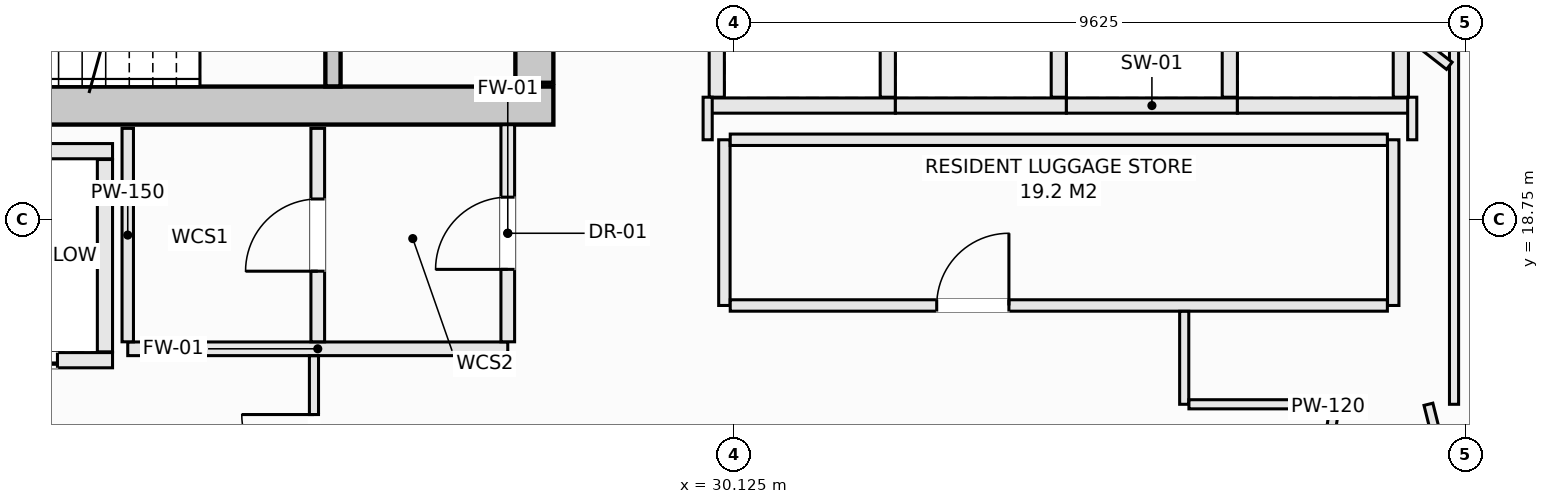
"""IFC4 building model, lengths in metres.
Left out: names, types, materials, properties, quantities, classifications, styles, units other than length and angle.
Written with IfcOpenShell. Run it as: python <this file> out.ifc"""

import sys

from ifc_helpers import new_model, si_unit, direction, frame, frame_2d, origin, place, context, subcontext, project, spatial, rectangle, extrude, element, fill, save


model = new_model("IFC4")
c1 = context("Model", 3, precision=1e-05, world=origin(), true_north=direction((0.0, 1.0)))
c2 = subcontext(c1, "Body", "Model", "MODEL_VIEW")
j1 = project(units=[si_unit("LENGTHUNIT", "METRE"), si_unit("PLANEANGLEUNIT", "RADIAN")], contexts=[c1])
p1 = place(None, origin())
s1 = spatial("IfcSite", under=j1, at=p1, CompositionType="ELEMENT")
p2 = place(p1, origin())
s2 = spatial("IfcBuilding", under=s1, at=p2, CompositionType="ELEMENT")
p3 = place(p2, frame((0.0, 0.0, 206.3)))
s3 = spatial("IfcBuildingStorey", under=s2, at=p3, CompositionType="ELEMENT", Elevation=206.3)
p4 = place(p3, frame((14.25, 20.25, -0.27), z_axis=(0.0, 0.0, 1.0), x_axis=(1.0, 0.0, 0.0)))
e1 = element("IfcWall", 1, at=p4, inside=s3, PredefinedType="SHEAR", context=c2, shape_type="SweptSolid", body=[
    extrude(rectangle(XDim=13.5, YDim=0.5, at=frame_2d((6.75, 0.0))), origin(), (0.0, 0.0, 1.0), 3.3),
])
p5 = place(p3, frame((27.5, 20.55, -0.27), z_axis=(0.0, 0.0, 1.0), x_axis=(0.0, 1.0, 0.0)))
e2 = element("IfcWall", 2, at=p5, inside=s3, PredefinedType="SHEAR", context=c2, shape_type="SweptSolid", body=[
    extrude(rectangle(XDim=1.5, YDim=0.5, at=frame_2d((0.75, 0.0))), origin(), (0.0, 0.0, 1.0), 3.3),
])
p6 = place(p3, frame((24.85, 20.502, -0.27), z_axis=(0.0, 0.0, 1.0), x_axis=(0.0, 1.0, 0.0)))
e3 = element("IfcWall", 3, at=p6, inside=s3, PredefinedType="SHEAR", context=c2, shape_type="SweptSolid", body=[
    extrude(rectangle(XDim=3.038, YDim=0.2, at=frame_2d((1.519, 0.0))), origin(), (0.0, 0.0, 1.0), 3.3),
])
p7 = place(p6, frame((0.969, 0.0, 0.27)))
e4 = element("IfcOpeningElement", 4, at=p7, cuts=e3, PredefinedType="OPENING", context=c2, shape_type="SweptSolid", body=[
    extrude(rectangle(XDim=1.1, YDim=2.15, at=frame_2d((0.55, 1.075))), frame((0.0, 0.11, 0.0), z_axis=(0.0, -1.0, 0.0), x_axis=(1.0, 0.0, 0.0)), (0.0, 0.0, 1.0), 0.22),
])
p8 = place(p3, frame((19.4, 19.65, 0.0), z_axis=(0.0, 0.0, 1.0), x_axis=(1.0, 0.0, 0.0)))
e5 = element("IfcWall", 5, at=p8, inside=s3, PredefinedType="SOLIDWALL", context=c2, shape_type="SweptSolid", body=[
    extrude(rectangle(XDim=2.55, YDim=0.2, at=frame_2d((1.275, 0.0))), origin(), (0.0, 0.0, 1.0), 3.03),
])
p9 = place(p3, frame((19.4, 16.9, 0.0), z_axis=(0.0, 0.0, 1.0), x_axis=(1.0, 0.0, 0.0)))
e6 = element("IfcWall", 6, at=p9, inside=s3, PredefinedType="SOLIDWALL", context=c2, shape_type="SweptSolid", body=[
    extrude(rectangle(XDim=2.55, YDim=0.2, at=frame_2d((1.275, 0.0))), origin(), (0.0, 0.0, 1.0), 3.03),
])
p10 = place(p9, frame((0.725, 0.0, 0.0)))
e7 = element("IfcOpeningElement", 7, at=p10, cuts=e6, PredefinedType="OPENING", context=c2, shape_type="SweptSolid", body=[
    extrude(rectangle(XDim=1.1, YDim=2.2, at=frame_2d((0.55, 1.1))), frame((0.0, 0.11, 0.0), z_axis=(0.0, -1.0, 0.0), x_axis=(1.0, 0.0, 0.0)), (0.0, 0.0, 1.0), 0.22),
])
p11 = place(p3, frame((21.85, 17.01, 0.0), z_axis=(0.0, 0.0, 1.0), x_axis=(0.0, 1.0, 0.0)))
e8 = element("IfcWall", 8, at=p11, inside=s3, PredefinedType="SOLIDWALL", context=c2, shape_type="SweptSolid", body=[
    extrude(rectangle(XDim=2.53, YDim=0.2, at=frame_2d((1.265, 0.0))), origin(), (0.0, 0.0, 1.0), 3.03),
])
p12 = place(p3, frame((29.8, 20.25, 0.0), z_axis=(0.0, 0.0, 1.0), x_axis=(1.0, 0.0, 0.0)))
e9 = element("IfcWall", 9, at=p12, inside=s3, PredefinedType="SOLIDWALL", context=c2, shape_type="SweptSolid", body=[
    extrude(rectangle(XDim=2.45, YDim=0.2, at=frame_2d((1.225, 0.0))), origin(), (0.0, 0.0, 1.0), 3.03),
])
for number, where, z_axis, x_axis in (
    (10, (29.9, 20.36, 0.0), (0.0, 0.0, 1.0), (0.0, 1.0, 0.0)),
    (11, (32.15, 20.36, 0.0), (0.0, 0.0, 1.0), (0.0, 1.0, 0.0)),
):
    element("IfcWall", number, at=place(p3, frame(where, z_axis=z_axis, x_axis=x_axis)), inside=s3, PredefinedType="SOLIDWALL", context=c2, shape_type="SweptSolid", body=[
        extrude(rectangle(XDim=2.43, YDim=0.2, at=frame_2d((1.215, 0.0))), origin(), (0.0, 0.0, 1.0), 3.03),
    ])
p13 = place(p3, frame((32.25, 20.25, 0.0), z_axis=(0.0, 0.0, 1.0), x_axis=(1.0, 0.0, 0.0)))
e12 = element("IfcWall", 12, at=p13, inside=s3, PredefinedType="SOLIDWALL", context=c2, shape_type="SweptSolid", body=[
    extrude(rectangle(XDim=2.25, YDim=0.2, at=frame_2d((1.125, 0.0))), origin(), (0.0, 0.0, 1.0), 3.03),
])
p14 = place(p3, frame((34.4, 20.36, 0.0), z_axis=(0.0, 0.0, 1.0), x_axis=(0.0, 1.0, 0.0)))
e13 = element("IfcWall", 13, at=p14, inside=s3, PredefinedType="SOLIDWALL", context=c2, shape_type="SweptSolid", body=[
    extrude(rectangle(XDim=2.43, YDim=0.2, at=frame_2d((1.215, 0.0))), origin(), (0.0, 0.0, 1.0), 3.03),
])
p15 = place(p3, frame((34.5, 20.25, 0.0), z_axis=(0.0, 0.0, 1.0), x_axis=(1.0, 0.0, 0.0)))
e14 = element("IfcWall", 14, at=p15, inside=s3, PredefinedType="SOLIDWALL", context=c2, shape_type="SweptSolid", body=[
    extrude(rectangle(XDim=2.25, YDim=0.2, at=frame_2d((1.125, 0.0))), origin(), (0.0, 0.0, 1.0), 3.03),
])
p16 = place(p3, frame((36.65, 20.36, 0.0), z_axis=(0.0, 0.0, 1.0), x_axis=(0.0, 1.0, 0.0)))
e15 = element("IfcWall", 15, at=p16, inside=s3, PredefinedType="SOLIDWALL", context=c2, shape_type="SweptSolid", body=[
    extrude(rectangle(XDim=2.43, YDim=0.2, at=frame_2d((1.215, 0.0))), origin(), (0.0, 0.0, 1.0), 3.03),
])
p17 = place(p3, frame((36.75, 20.25, 0.0), z_axis=(0.0, 0.0, 1.0), x_axis=(1.0, 0.0, 0.0)))
e16 = element("IfcWall", 16, at=p17, inside=s3, PredefinedType="SOLIDWALL", context=c2, shape_type="SweptSolid", body=[
    extrude(rectangle(XDim=2.25, YDim=0.2, at=frame_2d((1.125, 0.0))), origin(), (0.0, 0.0, 1.0), 3.03),
])
p18 = place(p3, frame((38.9, 20.36, 0.0), z_axis=(0.0, 0.0, 1.0), x_axis=(0.0, 1.0, 0.0)))
e17 = element("IfcWall", 17, at=p18, inside=s3, PredefinedType="SOLIDWALL", context=c2, shape_type="SweptSolid", body=[
    extrude(rectangle(XDim=2.43, YDim=0.2, at=frame_2d((1.215, 0.0))), origin(), (0.0, 0.0, 1.0), 3.03),
])
p19 = place(p3, frame((22.15, 17.05, 0.0), z_axis=(0.0, 0.0, 1.0), x_axis=(1.0, 0.0, 0.0)))
e18 = element("IfcWall", 18, at=p19, inside=s3, PredefinedType="SOLIDWALL", context=c2, shape_type="SweptSolid", body=[
    extrude(rectangle(XDim=5.0, YDim=0.18, at=frame_2d((2.5, 0.0))), origin(), (0.0, 0.0, 1.0), 3.03),
])
p20 = place(p3, frame((22.15, 17.142, 0.0), z_axis=(0.0, 0.0, 1.0), x_axis=(0.0, 1.0, 0.0)))
e19 = element("IfcWall", 19, at=p20, inside=s3, PredefinedType="PARTITIONING", context=c2, shape_type="SweptSolid", body=[
    extrude(rectangle(XDim=2.808, YDim=0.15, at=frame_2d((1.404, 0.0))), origin(), (0.0, 0.0, 1.0), 3.03),
])
p21 = place(p3, frame((24.65, 17.142, 0.0), z_axis=(0.0, 0.0, 1.0), x_axis=(0.0, 1.0, 0.0)))
e20 = element("IfcWall", 20, at=p21, inside=s3, PredefinedType="SOLIDWALL", context=c2, shape_type="SweptSolid", body=[
    extrude(rectangle(XDim=2.808, YDim=0.18, at=frame_2d((1.404, 0.0))), origin(), (0.0, 0.0, 1.0), 3.03),
])
p22 = place(p21, frame((0.929, 0.0, 0.0)))
e21 = element("IfcOpeningElement", 21, at=p22, cuts=e20, PredefinedType="OPENING", context=c2, shape_type="SweptSolid", body=[
    extrude(rectangle(XDim=0.95, YDim=2.1, at=frame_2d((0.475, 1.05))), frame((0.0, 0.1, 0.0), z_axis=(0.0, -1.0, 0.0), x_axis=(1.0, 0.0, 0.0)), (0.0, 0.0, 1.0), 0.2),
])
p23 = place(p3, frame((27.15, 17.142, 0.0), z_axis=(0.0, 0.0, 1.0), x_axis=(0.0, 1.0, 0.0)))
e22 = element("IfcWall", 22, at=p23, inside=s3, PredefinedType="SOLIDWALL", context=c2, shape_type="SweptSolid", body=[
    extrude(rectangle(XDim=2.856, YDim=0.18, at=frame_2d((1.428, 0.0))), origin(), (0.0, 0.0, 1.0), 3.03),
])
p24 = place(p23, frame((0.953, 0.0, 0.0)))
e23 = element("IfcOpeningElement", 23, at=p24, cuts=e22, PredefinedType="OPENING", context=c2, shape_type="SweptSolid", body=[
    extrude(rectangle(XDim=0.95, YDim=2.1, at=frame_2d((0.475, 1.05))), frame((0.0, 0.1, 0.0), z_axis=(0.0, -1.0, 0.0), x_axis=(1.0, 0.0, 0.0)), (0.0, 0.0, 1.0), 0.2),
])
for number, where, z_axis, x_axis in (
    (24, (30.0, 17.62, 0.0), (0.0, 0.0, 1.0), (0.0, 1.0, 0.0)),
    (25, (38.8, 17.62, 0.0), (0.0, 0.0, 1.0), (0.0, 1.0, 0.0)),
):
    element("IfcWall", number, at=place(p3, frame(where, z_axis=z_axis, x_axis=x_axis)), inside=s3, PredefinedType="PARTITIONING", context=c2, shape_type="SweptSolid", body=[
        extrude(rectangle(XDim=2.18, YDim=0.15, at=frame_2d((1.09, 0.0))), origin(), (0.0, 0.0, 1.0), 3.03),
    ])
p25 = place(p3, frame((30.077, 17.62, 0.0), z_axis=(0.0, 0.0, 1.0), x_axis=(1.0, 0.0, 0.0)))
e26 = element("IfcWall", 26, at=p25, inside=s3, PredefinedType="PARTITIONING", context=c2, shape_type="SweptSolid", body=[
    extrude(rectangle(XDim=8.646, YDim=0.15, at=frame_2d((4.323, 0.0))), origin(), (0.0, 0.0, 1.0), 3.03),
])
p26 = place(p25, frame((2.717, 0.0, 0.0)))
e27 = element("IfcOpeningElement", 27, at=p26, cuts=e26, PredefinedType="OPENING", context=c2, shape_type="SweptSolid", body=[
    extrude(rectangle(XDim=0.95, YDim=2.1, at=frame_2d((0.475, 1.05))), frame((0.0, 0.085, 0.0), z_axis=(0.0, -1.0, 0.0), x_axis=(1.0, 0.0, 0.0)), (0.0, 0.0, 1.0), 0.17),
])
p27 = place(p3, frame((30.077, 19.8, 0.0), z_axis=(0.0, 0.0, 1.0), x_axis=(1.0, 0.0, 0.0)))
e28 = element("IfcWall", 28, at=p27, inside=s3, PredefinedType="PARTITIONING", context=c2, shape_type="SweptSolid", body=[
    extrude(rectangle(XDim=8.646, YDim=0.15, at=frame_2d((4.323, 0.0))), origin(), (0.0, 0.0, 1.0), 3.03),
])
p28 = place(p3, frame((39.05, 19.8, 0.0), z_axis=(0.0, 0.0, 1.0), x_axis=(0.0, 1.0, 0.0)))
e29 = element("IfcWall", 29, at=p28, inside=s3, PredefinedType="PARTITIONING", context=c2, shape_type="SweptSolid", body=[
    extrude(rectangle(XDim=0.56, YDim=0.12, at=frame_2d((0.28, 0.0))), origin(), (0.0, 0.0, 1.0), 3.03),
])
p29 = place(p3, frame((39.6, 16.32, 0.0), z_axis=(0.0, 0.0, 1.0), x_axis=(0.0, 1.0, 0.0)))
e30 = element("IfcWall", 30, at=p29, inside=s3, PredefinedType="PARTITIONING", context=c2, shape_type="SweptSolid", body=[
    extrude(rectangle(XDim=6.7, YDim=0.12, at=frame_2d((3.35, 0.0))), origin(), (0.0, 0.0, 1.0), 2.478),
])
p30 = place(p3, frame((39.263, 16.32, 0.0), z_axis=(0.0, 0.0, 1.0), x_axis=(0.242535625036, -0.970142500145, 0.0)))
e31 = element("IfcWall", 31, at=p30, inside=s3, PredefinedType="PARTITIONING", context=c2, shape_type="SweptSolid", body=[
    extrude(rectangle(XDim=1.068, YDim=0.12, at=frame_2d((0.534, 0.0))), origin(), (0.0, 0.0, 1.0), 2.478),
])
p31 = place(p3, frame((29.78, 19.8, 0.0), z_axis=(0.0, 0.0, 1.0), x_axis=(0.0, 1.0, 0.0)))
e32 = element("IfcWall", 32, at=p31, inside=s3, PredefinedType="PARTITIONING", context=c2, shape_type="SweptSolid", body=[
    extrude(rectangle(XDim=0.56, YDim=0.12, at=frame_2d((0.28, 0.0))), origin(), (0.0, 0.0, 1.0), 3.03),
])
p32 = place(p3, frame((36.05, 16.32, 0.0), z_axis=(0.0, 0.0, 1.0), x_axis=(0.0, 1.0, 0.0)))
e33 = element("IfcWall", 33, at=p32, inside=s3, PredefinedType="PARTITIONING", context=c2, shape_type="SweptSolid", body=[
    extrude(rectangle(XDim=1.223, YDim=0.12, at=frame_2d((0.611, 0.0))), origin(), (0.0, 0.0, 1.0), 3.03),
])
p33 = place(p3, frame((36.112, 16.32, 0.0), z_axis=(0.0, 0.0, 1.0), x_axis=(1.0, 0.0, 0.0)))
e34 = element("IfcWall", 34, at=p33, inside=s3, PredefinedType="PARTITIONING", context=c2, shape_type="SweptSolid", body=[
    extrude(rectangle(XDim=1.921, YDim=0.12, at=frame_2d((0.96, 0.0))), origin(), (0.0, 0.0, 1.0), 3.03),
])
p34 = place(p3, frame((37.862, 15.201, 0.0), z_axis=(0.0, 0.0, 1.0), x_axis=(0.150907653202, 0.988547864398, 0.0)))
e35 = element("IfcWall", 35, at=p34, inside=s3, PredefinedType="PARTITIONING", context=c2, shape_type="SweptSolid", body=[
    extrude(rectangle(XDim=1.069, YDim=0.12, at=frame_2d((0.535, 0.0))), origin(), (0.0, 0.0, 1.0), 3.03),
])
p35 = place(p3, frame((24.6, 14.462, 0.0), z_axis=(0.0, 0.0, 1.0), x_axis=(0.0, 1.0, 0.0)))
e36 = element("IfcWall", 36, at=p35, inside=s3, PredefinedType="PARTITIONING", context=c2, shape_type="SweptSolid", body=[
    extrude(rectangle(XDim=2.496, YDim=0.12, at=frame_2d((1.248, 0.0))), origin(), (0.0, 0.0, 1.0), 3.03),
])
p36 = place(p35, frame((0.773, 0.0, 0.0)))
e37 = element("IfcOpeningElement", 37, at=p36, cuts=e36, PredefinedType="OPENING", context=c2, shape_type="SweptSolid", body=[
    extrude(rectangle(XDim=0.95, YDim=2.1, at=frame_2d((0.475, 1.05))), frame((0.0, 0.07, 0.0), z_axis=(0.0, -1.0, 0.0), x_axis=(1.0, 0.0, 0.0)), (0.0, 0.0, 1.0), 0.14),
])
p37 = place(p3, frame((10.818, 16.104, 0.0), z_axis=(0.0, 0.0, 1.0), x_axis=(0.994552287984, -0.104238891333, 0.0)))
e38 = element("IfcWall", 38, at=p37, inside=s3, PredefinedType="PARTITIONING", context=c2, shape_type="SweptSolid", body=[
    extrude(rectangle(XDim=13.795, YDim=0.12, at=frame_2d((6.897, 0.0))), origin(), (0.0, 0.0, 1.0), 2.605),
])
p38 = place(p3, frame((39.02, 21.178, 0.0), z_axis=(0.0, 0.0, 1.0), x_axis=(0.788170760396, -0.615456621101, 0.0)))
e39 = element("IfcWall", 39, at=p38, inside=s3, PredefinedType="PARTITIONING", context=c2, shape_type="SweptSolid", body=[
    extrude(rectangle(XDim=0.657, YDim=0.12, at=frame_2d((0.329, 0.0))), origin(), (0.0, 0.0, 1.0), 3.03),
])
p39 = place(p10, origin())
e40 = element("IfcDoor", 40, at=p39, inside=s3, OperationType="SLIDING_TO_LEFT", PredefinedType="DOOR", context=c2, shape_type="SweptSolid", body=[
    extrude(rectangle(XDim=1.1, YDim=2.2, at=frame_2d((0.55, 1.1))), frame((0.0, 0.025, 0.0), z_axis=(0.0, -1.0, 0.0), x_axis=(1.0, 0.0, 0.0)), (0.0, 0.0, 1.0), 0.05),
])
fill(e7, e40)
p40 = place(p24, origin())
e41 = element("IfcDoor", 41, at=p40, inside=s3, OperationType="SINGLE_SWING_LEFT", PredefinedType="DOOR", context=c2, shape_type="SweptSolid", body=[
    extrude(rectangle(XDim=0.95, YDim=2.1, at=frame_2d((0.475, 1.05))), frame((0.0, 0.025, 0.0), z_axis=(0.0, -1.0, 0.0), x_axis=(1.0, 0.0, 0.0)), (0.0, 0.0, 1.0), 0.05),
])
fill(e23, e41)
p41 = place(p26, origin())
e42 = element("IfcDoor", 42, at=p41, inside=s3, OperationType="SINGLE_SWING_RIGHT", PredefinedType="DOOR", context=c2, shape_type="SweptSolid", body=[
    extrude(rectangle(XDim=0.95, YDim=2.1, at=frame_2d((0.475, 1.05))), frame((0.0, 0.025, 0.0), z_axis=(0.0, -1.0, 0.0), x_axis=(1.0, 0.0, 0.0)), (0.0, 0.0, 1.0), 0.05),
])
fill(e27, e42)
p42 = place(p36, origin())
e43 = element("IfcDoor", 43, at=p42, inside=s3, OperationType="SINGLE_SWING_RIGHT", PredefinedType="DOOR", context=c2, shape_type="SweptSolid", body=[
    extrude(rectangle(XDim=0.95, YDim=2.1, at=frame_2d((0.475, 1.05))), frame((0.0, 0.025, 0.0), z_axis=(0.0, -1.0, 0.0), x_axis=(1.0, 0.0, 0.0)), (0.0, 0.0, 1.0), 0.05),
])
fill(e37, e43)
p43 = place(p22, origin())
e44 = element("IfcDoor", 44, at=p43, inside=s3, OperationType="SINGLE_SWING_LEFT", PredefinedType="DOOR", context=c2, shape_type="SweptSolid", body=[
    extrude(rectangle(XDim=0.95, YDim=2.1, at=frame_2d((0.475, 1.05))), frame((0.0, 0.025, 0.0), z_axis=(0.0, -1.0, 0.0), x_axis=(1.0, 0.0, 0.0)), (0.0, 0.0, 1.0), 0.05),
])
fill(e21, e44)
save(model, sys.argv[1])
